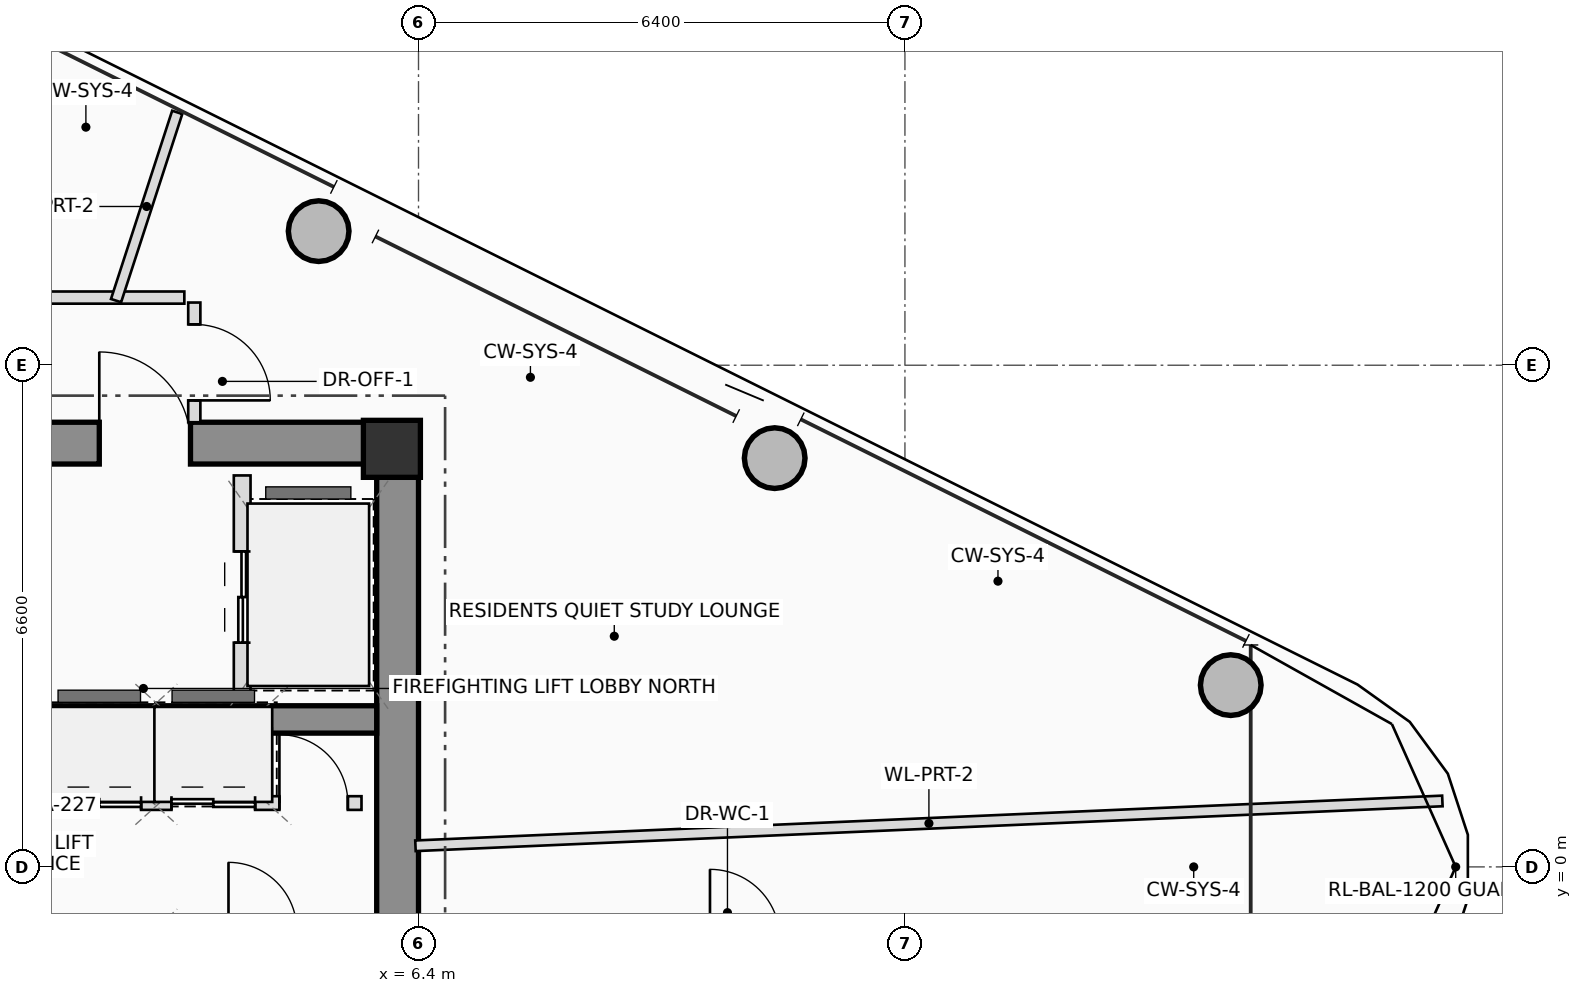
"""IFC4 building model, lengths in metres.
Left out: names, types, materials, properties, quantities, classifications, styles, units other than length and angle.
Written with IfcOpenShell. Run it as: python <this file> out.ifc"""

import sys

from ifc_helpers import new_model, si_unit, direction, frame, frame_2d, origin, origin_2d, place, context, subcontext, project, spatial, rectangle, hollow_circle, extrude, source, transform, mapped, element, fill, save


model = new_model("IFC4")
c1 = context("Model", 3, precision=1e-05, world=origin(), true_north=direction((0.0, 1.0)))
c2 = subcontext(c1, "Body", "Model", "MODEL_VIEW")
j1 = project(units=[si_unit("LENGTHUNIT", "METRE"), si_unit("PLANEANGLEUNIT", "RADIAN")], contexts=[c1])
p1 = place(None, origin())
s1 = spatial("IfcSite", under=j1, at=p1, CompositionType="ELEMENT")
p2 = place(p1, origin())
s2 = spatial("IfcBuilding", under=s1, at=p2, CompositionType="ELEMENT")
p3 = place(p2, frame((0.0, 0.0, 303.65)))
s3 = spatial("IfcBuildingStorey", under=s2, at=p3, CompositionType="ELEMENT", Elevation=303.65)
m1 = source(origin(), c2, "Body", "SweptSolid", [
    extrude(rectangle(XDim=0.75, YDim=0.75, at=origin_2d()), origin(), (0.0, 0.0, 1.0), 3.45),
])
p4 = place(p3, frame((6.05, 5.5, 0.0), z_axis=(0.0, 0.0, 1.0), x_axis=(1.0, 0.0, 0.0)))
e1 = element("IfcColumn", 1, at=p4, inside=s3, PredefinedType="COLUMN", context=c2, shape_type="MappedRepresentation", body=[
    mapped(m1, transform((0.0, 0.0, 0.0), scale=1.0)),
])
p5 = place(p3, frame((-6.4, 5.575, 0.0), z_axis=(0.0, 0.0, 1.0), x_axis=(1.0, 0.0, 0.0)))
e2 = element("IfcWall", 2, at=p5, inside=s3, PredefinedType="SHEAR", context=c2, shape_type="SweptSolid", body=[
    extrude(rectangle(XDim=12.8, YDim=0.55, at=frame_2d((6.4, 0.0))), origin(), (0.0, 0.0, 1.0), 3.45),
])
p6 = place(p5, frame((8.6, 0.0, 0.0)))
e3 = element("IfcOpeningElement", 3, at=p6, cuts=e2, PredefinedType="OPENING", context=c2, shape_type="SweptSolid", body=[
    extrude(rectangle(XDim=1.2, YDim=2.2, at=frame_2d((0.6, 1.1))), frame((0.0, 0.285, 0.0), z_axis=(0.0, -1.0, 0.0), x_axis=(1.0, 0.0, 0.0)), (0.0, 0.0, 1.0), 0.57),
])
p7 = place(p3, frame((6.125, -5.3, 0.0), z_axis=(0.0, 0.0, 1.0), x_axis=(0.0, 1.0, 0.0)))
e4 = element("IfcWall", 4, at=p7, inside=s3, PredefinedType="SHEAR", context=c2, shape_type="SweptSolid", body=[
    extrude(rectangle(XDim=10.6, YDim=0.55, at=frame_2d((5.3, 0.0))), origin(), (0.0, 0.0, 1.0), 3.45),
])
p8 = place(p3, frame((-5.85, 1.94, 0.0), z_axis=(0.0, 0.0, 1.0), x_axis=(1.0, 0.0, 0.0)))
e5 = element("IfcWall", 5, at=p8, inside=s3, PredefinedType="SHEAR", context=c2, shape_type="SweptSolid", body=[
    extrude(rectangle(XDim=11.7, YDim=0.36, at=frame_2d((5.85, 0.0))), origin(), (0.0, 0.0, 1.0), 3.45),
])
m2 = source(origin(), c2, "Body", "SweptSolid", [
    extrude(hollow_circle(Radius=0.4, WallThickness=0.028, at=origin_2d()), origin(), (0.0, 0.0, 1.0), 3.45),
])
for number, where, z_axis, x_axis in (
    (6, (17.087, 2.392, 0.0), (0.0, 0.0, 1.0), (1.0, 0.0, 0.0)),
    (7, (11.086, 5.378, 0.0), (0.0, 0.0, 1.0), (1.0, 0.0, 0.0)),
    (8, (5.086, 8.364, 0.0), (0.0, 0.0, 1.0), (1.0, 0.0, 0.0)),
):
    element("IfcColumn", number, at=place(p3, frame(where, z_axis=z_axis, x_axis=x_axis)), inside=s3, PredefinedType="COLUMN", context=c2, shape_type="MappedRepresentation", body=[
        mapped(m2, transform((0.0, 0.0, 0.0), scale=1.0)),
    ])
p9 = place(p3, frame((4.08, 2.2, 0.0), z_axis=(0.0, 0.0, 1.0), x_axis=(0.0, 1.0, 0.0)))
e9 = element("IfcWall", 9, at=p9, inside=s3, PredefinedType="PLUMBINGWALL", context=c2, shape_type="SweptSolid", body=[
    extrude(rectangle(XDim=2.95, YDim=0.22, at=frame_2d((1.475, 0.0))), origin(), (0.0, 0.0, 1.0), 3.25),
])
p10 = place(p9, frame((0.75, 0.0, 0.0)))
e10 = element("IfcOpeningElement", 10, at=p10, cuts=e9, PredefinedType="OPENING", context=c2, shape_type="SweptSolid", body=[
    extrude(rectangle(XDim=1.2, YDim=2.25, at=frame_2d((0.6, 1.125))), frame((0.0, 0.12, 0.0), z_axis=(0.0, -1.0, 0.0), x_axis=(1.0, 0.0, 0.0)), (0.0, 0.0, 1.0), 0.24),
])
for number, where, z_axis, x_axis in (
    (11, (3.02, 0.84, 0.0), (0.0, 0.0, 1.0), (0.0, 1.0, 0.0)),
    (12, (4.38, 0.84, 0.0), (0.0, 0.0, 1.0), (0.0, 1.0, 0.0)),
):
    element("IfcWall", number, at=place(p3, frame(where, z_axis=z_axis, x_axis=x_axis)), inside=s3, PredefinedType="PLUMBINGWALL", context=c2, shape_type="SweptSolid", body=[
        extrude(rectangle(XDim=0.98, YDim=0.18, at=frame_2d((0.49, 0.0))), origin(), (0.0, 0.0, 1.0), 3.25),
    ])
p11 = place(p3, frame((-5.68, 0.84, 0.0), z_axis=(0.0, 0.0, 1.0), x_axis=(1.0, 0.0, 0.0)))
e13 = element("IfcWall", 13, at=p11, inside=s3, PredefinedType="PLUMBINGWALL", context=c2, shape_type="SweptSolid", body=[
    extrude(rectangle(XDim=11.33, YDim=0.18, at=frame_2d((5.665, 0.0))), origin(), (0.0, 0.0, 1.0), 3.25),
])
p12 = place(p11, frame((3.13, 0.0, 0.0)))
e14 = element("IfcOpeningElement", 14, at=p12, cuts=e13, PredefinedType="OPENING", context=c2, shape_type="SweptSolid", body=[
    extrude(rectangle(XDim=0.9, YDim=2.05, at=frame_2d((0.45, 1.025))), frame((0.0, 0.1, 0.0), z_axis=(0.0, -1.0, 0.0), x_axis=(1.0, 0.0, 0.0)), (0.0, 0.0, 1.0), 0.2),
])
p13 = place(p11, frame((7.33, 0.0, 0.0)))
e15 = element("IfcOpeningElement", 15, at=p13, cuts=e13, PredefinedType="OPENING", context=c2, shape_type="SweptSolid", body=[
    extrude(rectangle(XDim=1.1, YDim=2.2, at=frame_2d((0.55, 1.1))), frame((0.0, 0.1, 0.0), z_axis=(0.0, -1.0, 0.0), x_axis=(1.0, 0.0, 0.0)), (0.0, 0.0, 1.0), 0.2),
])
p14 = place(p11, frame((8.83, 0.0, 0.0)))
e16 = element("IfcOpeningElement", 16, at=p14, cuts=e13, PredefinedType="OPENING", context=c2, shape_type="SweptSolid", body=[
    extrude(rectangle(XDim=1.1, YDim=2.2, at=frame_2d((0.55, 1.1))), frame((0.0, 0.1, 0.0), z_axis=(0.0, -1.0, 0.0), x_axis=(1.0, 0.0, 0.0)), (0.0, 0.0, 1.0), 0.2),
])
p15 = place(p11, frame((10.25, 0.0, 0.0)))
e17 = element("IfcOpeningElement", 17, at=p15, cuts=e13, PredefinedType="OPENING", context=c2, shape_type="SweptSolid", body=[
    extrude(rectangle(XDim=0.9, YDim=2.05, at=frame_2d((0.45, 1.025))), frame((0.0, 0.1, 0.0), z_axis=(0.0, -1.0, 0.0), x_axis=(1.0, 0.0, 0.0)), (0.0, 0.0, 1.0), 0.2),
])
p16 = place(p3, frame((-6.36, 7.49, 0.0), z_axis=(0.0, 0.0, 1.0), x_axis=(1.0, 0.0, 0.0)))
e18 = element("IfcWall", 18, at=p16, inside=s3, PredefinedType="PARTITIONING", context=c2, shape_type="SweptSolid", body=[
    extrude(rectangle(XDim=9.679, YDim=0.16, at=frame_2d((4.84, 0.0))), origin(), (0.0, 0.0, 1.0), 2.655),
])
p17 = place(p3, frame((3.45, 7.425, 0.0), z_axis=(0.0, 0.0, 1.0), x_axis=(0.0, -1.0, 0.0)))
e19 = element("IfcWall", 19, at=p17, inside=s3, PredefinedType="PARTITIONING", context=c2, shape_type="SweptSolid", body=[
    extrude(rectangle(XDim=1.575, YDim=0.16, at=frame_2d((0.787, 0.0))), origin(), (0.0, 0.0, 1.0), 2.855),
])
p18 = place(p17, frame((0.287, 0.0, 0.0)))
e20 = element("IfcOpeningElement", 20, at=p18, cuts=e19, PredefinedType="OPENING", context=c2, shape_type="SweptSolid", body=[
    extrude(rectangle(XDim=1.0, YDim=2.25, at=frame_2d((0.5, 1.125))), frame((0.0, 0.09, 0.0), z_axis=(0.0, -1.0, 0.0), x_axis=(1.0, 0.0, 0.0)), (0.0, 0.0, 1.0), 0.18),
])
p19 = place(p3, frame((6.36, 0.278, 0.0), z_axis=(0.0, 0.0, 1.0), x_axis=(0.999047623791, 0.043633076864, 0.0)))
e21 = element("IfcWall", 21, at=p19, inside=s3, PredefinedType="PARTITIONING", context=c2, shape_type="SweptSolid", body=[
    extrude(rectangle(XDim=13.524, YDim=0.14, at=frame_2d((6.762, 0.0))), origin(), (0.0, 0.0, 1.0), 2.815),
])
p20 = place(p3, frame((2.421, 7.45, 0.0), z_axis=(0.0, 0.0, 1.0), x_axis=(0.309047920595, 0.951046467201, 0.0)))
e22 = element("IfcWall", 22, at=p20, inside=s3, PredefinedType="PARTITIONING", context=c2, shape_type="SweptSolid", body=[
    extrude(rectangle(XDim=2.604, YDim=0.14, at=frame_2d((1.302, 0.0))), origin(), (0.0, 0.0, 1.0), 2.815),
])
p21 = place(p6, origin())
e23 = element("IfcDoor", 23, at=p21, inside=s3, OperationType="SINGLE_SWING_LEFT", PredefinedType="DOOR", context=c2, shape_type="SweptSolid", body=[
    extrude(rectangle(XDim=1.2, YDim=2.2, at=frame_2d((0.6, 1.1))), frame((0.0, 0.025, 0.0), z_axis=(0.0, -1.0, 0.0), x_axis=(1.0, 0.0, 0.0)), (0.0, 0.0, 1.0), 0.05),
])
fill(e3, e23)
p22 = place(p10, origin())
e24 = element("IfcDoor", 24, at=p22, inside=s3, OperationType="DOUBLE_DOOR_SLIDING", PredefinedType="DOOR", context=c2, shape_type="SweptSolid", body=[
    extrude(rectangle(XDim=1.2, YDim=2.25, at=frame_2d((0.6, 1.125))), frame((0.0, 0.025, 0.0), z_axis=(0.0, -1.0, 0.0), x_axis=(1.0, 0.0, 0.0)), (0.0, 0.0, 1.0), 0.05),
])
fill(e10, e24)
p23 = place(p13, origin())
e25 = element("IfcDoor", 25, at=p23, inside=s3, OperationType="DOUBLE_DOOR_SLIDING", PredefinedType="DOOR", context=c2, shape_type="SweptSolid", body=[
    extrude(rectangle(XDim=1.1, YDim=2.2, at=frame_2d((0.55, 1.1))), frame((0.0, 0.025, 0.0), z_axis=(0.0, -1.0, 0.0), x_axis=(1.0, 0.0, 0.0)), (0.0, 0.0, 1.0), 0.05),
])
fill(e15, e25)
p24 = place(p14, origin())
e26 = element("IfcDoor", 26, at=p24, inside=s3, OperationType="DOUBLE_DOOR_SLIDING", PredefinedType="DOOR", context=c2, shape_type="SweptSolid", body=[
    extrude(rectangle(XDim=1.1, YDim=2.2, at=frame_2d((0.55, 1.1))), frame((0.0, 0.025, 0.0), z_axis=(0.0, -1.0, 0.0), x_axis=(1.0, 0.0, 0.0)), (0.0, 0.0, 1.0), 0.05),
])
fill(e16, e26)
p25 = place(p15, origin())
e27 = element("IfcDoor", 27, at=p25, inside=s3, OperationType="SINGLE_SWING_LEFT", PredefinedType="DOOR", context=c2, shape_type="SweptSolid", body=[
    extrude(rectangle(XDim=0.9, YDim=2.05, at=frame_2d((0.45, 1.025))), frame((0.0, 0.025, 0.0), z_axis=(0.0, -1.0, 0.0), x_axis=(1.0, 0.0, 0.0)), (0.0, 0.0, 1.0), 0.05),
])
fill(e17, e27)
p26 = place(p18, origin())
e28 = element("IfcDoor", 28, at=p26, inside=s3, OperationType="SINGLE_SWING_RIGHT", PredefinedType="DOOR", context=c2, shape_type="SweptSolid", body=[
    extrude(rectangle(XDim=1.0, YDim=2.25, at=frame_2d((0.5, 1.125))), frame((0.0, 0.025, 0.0), z_axis=(0.0, -1.0, 0.0), x_axis=(1.0, 0.0, 0.0)), (0.0, 0.0, 1.0), 0.05),
])
fill(e20, e28)
save(model, sys.argv[1])
